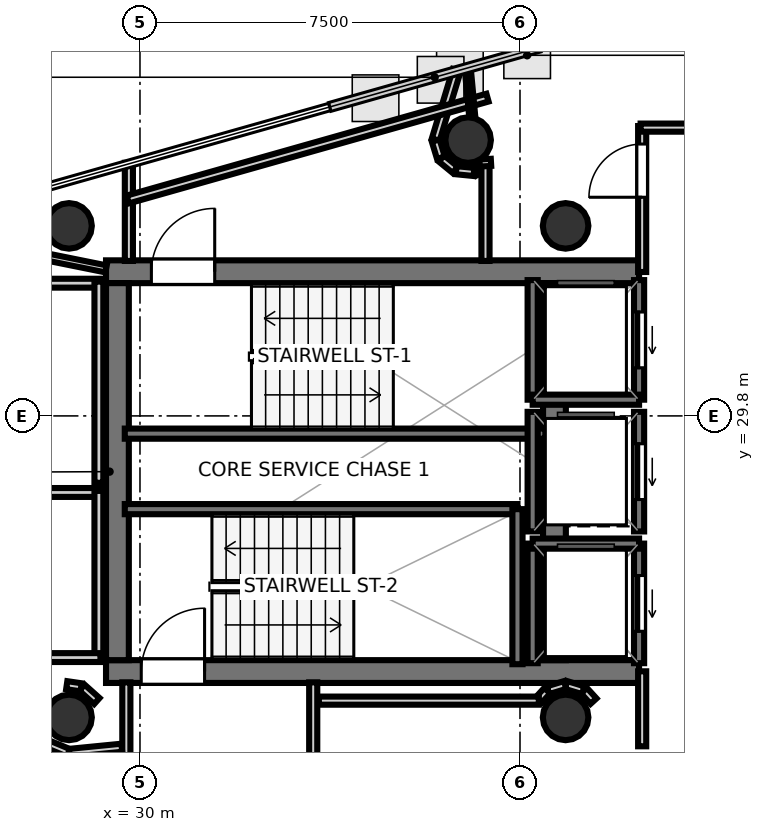
"""IFC4 building model, lengths in metres.
Left out: names, types, materials, properties, quantities, classifications, styles, units other than length and angle.
Written with IfcOpenShell. Run it as: python <this file> out.ifc"""

import sys

from ifc_helpers import new_model, si_unit, direction, frame, frame_2d, origin, origin_2d, place, context, subcontext, project, spatial, rectangle, hollow_circle, extrude, element, fill, save


model = new_model("IFC4")
c1 = context("Model", 3, precision=1e-05, world=origin(), true_north=direction((0.0, 1.0)))
c2 = subcontext(c1, "Body", "Model", "MODEL_VIEW")
j1 = project(units=[si_unit("LENGTHUNIT", "METRE"), si_unit("PLANEANGLEUNIT", "RADIAN")], contexts=[c1])
p1 = place(None, origin())
s1 = spatial("IfcSite", under=j1, at=p1, CompositionType="ELEMENT")
p2 = place(p1, origin())
s2 = spatial("IfcBuilding", under=s1, at=p2, CompositionType="ELEMENT")
p3 = place(p2, frame((0.0, 0.0, 317.6)))
s3 = spatial("IfcBuildingStorey", under=s2, at=p3, CompositionType="ELEMENT", Elevation=317.6)
p4 = place(p3, frame((29.33, 32.645, 0.0), z_axis=(0.0, 0.0, 1.0), x_axis=(1.0, 0.0, 0.0)))
e1 = element("IfcWall", 1, at=p4, inside=s3, PredefinedType="SHEAR", context=c2, shape_type="SweptSolid", body=[
    extrude(rectangle(XDim=10.52, YDim=0.45, at=frame_2d((5.26, 0.0))), origin(), (0.0, 0.0, 1.0), 3.4),
])
p5 = place(p4, frame((0.895, 0.0, 0.0)))
e2 = element("IfcOpeningElement", 2, at=p5, cuts=e1, PredefinedType="OPENING", context=c2, shape_type="SweptSolid", body=[
    extrude(rectangle(XDim=1.25, YDim=2.15, at=frame_2d((0.625, 1.075))), frame((0.0, 0.235, 0.0), z_axis=(0.0, -1.0, 0.0), x_axis=(1.0, 0.0, 0.0)), (0.0, 0.0, 1.0), 0.47),
])
p6 = place(p3, frame((29.33, 24.755, 0.0), z_axis=(0.0, 0.0, 1.0), x_axis=(1.0, 0.0, 0.0)))
e3 = element("IfcWall", 3, at=p6, inside=s3, PredefinedType="SHEAR", context=c2, shape_type="SweptSolid", body=[
    extrude(rectangle(XDim=10.52, YDim=0.45, at=frame_2d((5.26, 0.0))), origin(), (0.0, 0.0, 1.0), 3.4),
])
p7 = place(p6, frame((0.695, 0.0, 0.0)))
e4 = element("IfcOpeningElement", 4, at=p7, cuts=e3, PredefinedType="OPENING", context=c2, shape_type="SweptSolid", body=[
    extrude(rectangle(XDim=1.25, YDim=2.15, at=frame_2d((0.625, 1.075))), frame((0.0, 0.235, 0.0), z_axis=(0.0, -1.0, 0.0), x_axis=(1.0, 0.0, 0.0)), (0.0, 0.0, 1.0), 0.47),
])
for number, where, z_axis, x_axis in (
    (5, (29.555, 24.98, 0.0), (0.0, 0.0, 1.0), (0.0, 1.0, 0.0)),
    (6, (38.18, 24.98, 0.0), (0.0, 0.0, 1.0), (0.0, 1.0, 0.0)),
):
    element("IfcWall", number, at=place(p3, frame(where, z_axis=z_axis, x_axis=x_axis)), inside=s3, PredefinedType="SHEAR", context=c2, shape_type="SweptSolid", body=[
        extrude(rectangle(XDim=7.44, YDim=0.45, at=frame_2d((3.72, 0.0))), origin(), (0.0, 0.0, 1.0), 3.4),
    ])
for number, where, z_axis, x_axis in (
    (7, (28.6, 33.55, 0.0), (0.0, 0.0, 1.0), (1.0, 0.0, 0.0)),
    (8, (28.6, 23.85, 0.0), (0.0, 0.0, 1.0), (1.0, 0.0, 0.0)),
    (9, (38.4, 33.55, 0.0), (0.0, 0.0, 1.0), (1.0, 0.0, 0.0)),
    (10, (38.4, 23.85, 0.0), (0.0, 0.0, 1.0), (1.0, 0.0, 0.0)),
    (11, (36.476, 35.243, 0.0), (0.0, 0.0, 1.0), (1.0, 0.0, 0.0)),
):
    element("IfcColumn", number, at=place(p3, frame(where, z_axis=z_axis, x_axis=x_axis)), inside=s3, PredefinedType="COLUMN", context=c2, shape_type="SweptSolid", body=[
        extrude(hollow_circle(Radius=0.45, WallThickness=0.025, at=origin_2d()), origin(), (0.0, 0.0, 1.0), 3.7),
    ])
p8 = place(p3, frame((29.7, 29.45, 0.0), z_axis=(0.0, 0.0, 1.0), x_axis=(1.0, 0.0, 0.0)))
e12 = element("IfcWall", 12, at=p8, inside=s3, PredefinedType="SOLIDWALL", context=c2, shape_type="SweptSolid", body=[
    extrude(rectangle(XDim=8.3, YDim=0.2, at=frame_2d((4.15, 0.0))), origin(), (0.0, 0.0, 1.0), 3.4),
])
p9 = place(p3, frame((29.7, 27.96, 0.0), z_axis=(0.0, 0.0, 1.0), x_axis=(1.0, 0.0, 0.0)))
e13 = element("IfcWall", 13, at=p9, inside=s3, PredefinedType="SOLIDWALL", context=c2, shape_type="SweptSolid", body=[
    extrude(rectangle(XDim=7.75, YDim=0.2, at=frame_2d((3.875, 0.0))), origin(), (0.0, 0.0, 1.0), 3.4),
])
p10 = place(p3, frame((37.45, 24.9, 0.0), z_axis=(0.0, 0.0, 1.0), x_axis=(0.0, 1.0, 0.0)))
e14 = element("IfcWall", 14, at=p10, inside=s3, PredefinedType="SOLIDWALL", context=c2, shape_type="SweptSolid", body=[
    extrude(rectangle(XDim=3.06, YDim=0.2, at=frame_2d((1.53, 0.0))), origin(), (0.0, 0.0, 1.0), 3.4),
])
p11 = place(p3, frame((39.85, 30.12, 0.0), z_axis=(0.0, 0.0, 1.0), x_axis=(0.0, 1.0, 0.0)))
e15 = element("IfcWall", 15, at=p11, inside=s3, PredefinedType="SOLIDWALL", context=c2, shape_type="SweptSolid", body=[
    extrude(rectangle(XDim=2.36, YDim=0.2, at=frame_2d((1.18, 0.0))), origin(), (0.0, 0.0, 1.0), 3.4),
])
p12 = place(p11, frame((0.63, 0.0, 0.0)))
e16 = element("IfcOpeningElement", 16, at=p12, cuts=e15, PredefinedType="OPENING", context=c2, shape_type="SweptSolid", body=[
    extrude(rectangle(XDim=1.1, YDim=2.15, at=frame_2d((0.55, 1.075))), frame((0.0, 0.11, 0.0), z_axis=(0.0, -1.0, 0.0), x_axis=(1.0, 0.0, 0.0)), (0.0, 0.0, 1.0), 0.22),
])
p13 = place(p3, frame((37.75, 30.12, 0.0), z_axis=(0.0, 0.0, 1.0), x_axis=(0.0, 1.0, 0.0)))
e17 = element("IfcWall", 17, at=p13, inside=s3, PredefinedType="SOLIDWALL", context=c2, shape_type="SweptSolid", body=[
    extrude(rectangle(XDim=2.36, YDim=0.2, at=frame_2d((1.18, 0.0))), origin(), (0.0, 0.0, 1.0), 3.4),
])
p14 = place(p3, frame((37.75, 30.12, 0.0), z_axis=(0.0, 0.0, 1.0), x_axis=(1.0, 0.0, 0.0)))
e18 = element("IfcWall", 18, at=p14, inside=s3, PredefinedType="SOLIDWALL", context=c2, shape_type="SweptSolid", body=[
    extrude(rectangle(XDim=2.1, YDim=0.2, at=frame_2d((1.05, 0.0))), origin(), (0.0, 0.0, 1.0), 3.4),
])
p15 = place(p3, frame((39.85, 24.92, 0.0), z_axis=(0.0, 0.0, 1.0), x_axis=(0.0, 1.0, 0.0)))
e19 = element("IfcWall", 19, at=p15, inside=s3, PredefinedType="SOLIDWALL", context=c2, shape_type="SweptSolid", body=[
    extrude(rectangle(XDim=2.36, YDim=0.2, at=frame_2d((1.18, 0.0))), origin(), (0.0, 0.0, 1.0), 3.4),
])
p16 = place(p15, frame((0.63, 0.0, 0.0)))
e20 = element("IfcOpeningElement", 20, at=p16, cuts=e19, PredefinedType="OPENING", context=c2, shape_type="SweptSolid", body=[
    extrude(rectangle(XDim=1.1, YDim=2.15, at=frame_2d((0.55, 1.075))), frame((0.0, 0.11, 0.0), z_axis=(0.0, -1.0, 0.0), x_axis=(1.0, 0.0, 0.0)), (0.0, 0.0, 1.0), 0.22),
])
p17 = place(p3, frame((37.75, 24.92, 0.0), z_axis=(0.0, 0.0, 1.0), x_axis=(0.0, 1.0, 0.0)))
e21 = element("IfcWall", 21, at=p17, inside=s3, PredefinedType="SOLIDWALL", context=c2, shape_type="SweptSolid", body=[
    extrude(rectangle(XDim=2.36, YDim=0.2, at=frame_2d((1.18, 0.0))), origin(), (0.0, 0.0, 1.0), 3.4),
])
p18 = place(p3, frame((37.75, 27.28, 0.0), z_axis=(0.0, 0.0, 1.0), x_axis=(1.0, 0.0, 0.0)))
e22 = element("IfcWall", 22, at=p18, inside=s3, PredefinedType="SOLIDWALL", context=c2, shape_type="SweptSolid", body=[
    extrude(rectangle(XDim=2.1, YDim=0.2, at=frame_2d((1.05, 0.0))), origin(), (0.0, 0.0, 1.0), 3.4),
])
p19 = place(p3, frame((39.85, 27.52, 0.0), z_axis=(0.0, 0.0, 1.0), x_axis=(0.0, 1.0, 0.0)))
e23 = element("IfcWall", 23, at=p19, inside=s3, PredefinedType="SOLIDWALL", context=c2, shape_type="SweptSolid", body=[
    extrude(rectangle(XDim=2.36, YDim=0.2, at=frame_2d((1.18, 0.0))), origin(), (0.0, 0.0, 1.0), 3.4),
])
p20 = place(p19, frame((0.63, 0.0, 0.0)))
e24 = element("IfcOpeningElement", 24, at=p20, cuts=e23, PredefinedType="OPENING", context=c2, shape_type="SweptSolid", body=[
    extrude(rectangle(XDim=1.1, YDim=2.15, at=frame_2d((0.55, 1.075))), frame((0.0, 0.11, 0.0), z_axis=(0.0, -1.0, 0.0), x_axis=(1.0, 0.0, 0.0)), (0.0, 0.0, 1.0), 0.22),
])
p21 = place(p3, frame((37.75, 27.52, 0.0), z_axis=(0.0, 0.0, 1.0), x_axis=(0.0, 1.0, 0.0)))
e25 = element("IfcWall", 25, at=p21, inside=s3, PredefinedType="SOLIDWALL", context=c2, shape_type="SweptSolid", body=[
    extrude(rectangle(XDim=2.36, YDim=0.2, at=frame_2d((1.18, 0.0))), origin(), (0.0, 0.0, 1.0), 3.4),
])
p22 = place(p3, frame((36.252, 36.624, 0.0), z_axis=(0.0, 0.0, 1.0), x_axis=(-0.290314558178, -0.956931270944, 0.0)))
e26 = element("IfcWall", 26, at=p22, inside=s3, PredefinedType="PARTITIONING", context=c2, shape_type="SweptSolid", body=[
    extrude(rectangle(XDim=1.434, YDim=0.16, at=frame_2d((0.717, 0.0))), origin(), (0.0, 0.0, 1.0), 2.72),
])
p23 = place(p3, frame((35.836, 35.234, 0.0), z_axis=(0.0, 0.0, 1.0), x_axis=(0.29088731233, -0.956757321124, 0.0)))
e27 = element("IfcWall", 27, at=p23, inside=s3, PredefinedType="PARTITIONING", context=c2, shape_type="SweptSolid", body=[
    extrude(rectangle(XDim=0.354, YDim=0.16, at=frame_2d((0.177, 0.0))), origin(), (0.0, 0.0, 1.0), 2.72),
])
p24 = place(p3, frame((35.949, 34.88, 0.0), z_axis=(0.0, 0.0, 1.0), x_axis=(0.77300400279, -0.634401144128, 0.0)))
e28 = element("IfcWall", 28, at=p24, inside=s3, PredefinedType="PARTITIONING", context=c2, shape_type="SweptSolid", body=[
    extrude(rectangle(XDim=0.354, YDim=0.16, at=frame_2d((0.177, 0.0))), origin(), (0.0, 0.0, 1.0), 2.72),
])
p25 = place(p3, frame((36.24, 34.649, 0.0), z_axis=(0.0, 0.0, 1.0), x_axis=(0.995199611942, -0.097865889817, 0.0)))
e29 = element("IfcWall", 29, at=p25, inside=s3, PredefinedType="PARTITIONING", context=c2, shape_type="SweptSolid", body=[
    extrude(rectangle(XDim=0.354, YDim=0.16, at=frame_2d((0.177, 0.0))), origin(), (0.0, 0.0, 1.0), 2.72),
])
p26 = place(p3, frame((36.608, 34.617, 0.0), z_axis=(0.0, 0.0, 1.0), x_axis=(0.905429465341, 0.424496741203, 0.0)))
e30 = element("IfcWall", 30, at=p26, inside=s3, PredefinedType="PARTITIONING", context=c2, shape_type="SweptSolid", body=[
    extrude(rectangle(XDim=0.1, YDim=0.16, at=frame_2d((0.05, 0.0))), origin(), (0.0, 0.0, 1.0), 2.72),
])
p27 = place(p3, frame((36.819, 34.765, 0.0), z_axis=(0.0, 0.0, 1.0), x_axis=(0.0, -1.0, 0.0)))
e31 = element("IfcWall", 31, at=p27, inside=s3, PredefinedType="PARTITIONING", context=c2, shape_type="SweptSolid", body=[
    extrude(rectangle(XDim=1.907, YDim=0.16, at=frame_2d((0.953, 0.0))), origin(), (0.0, 0.0, 1.0), 2.72),
])
p28 = place(p3, frame((29.781, 32.858, 0.0), z_axis=(0.0, 0.0, 1.0), x_axis=(0.0, 1.0, 0.0)))
e32 = element("IfcWall", 32, at=p28, inside=s3, PredefinedType="PARTITIONING", context=c2, shape_type="SweptSolid", body=[
    extrude(rectangle(XDim=1.937, YDim=0.16, at=frame_2d((0.968, 0.0))), origin(), (0.0, 0.0, 1.0), 2.72),
])
p29 = place(p3, frame((29.758, 34.071, 0.0), z_axis=(0.0, 0.0, 1.0), x_axis=(0.962177906446, 0.272421872006, 0.0)))
e33 = element("IfcWall", 33, at=p29, inside=s3, PredefinedType="PARTITIONING", context=c2, shape_type="SweptSolid", body=[
    extrude(rectangle(XDim=7.379, YDim=0.16, at=frame_2d((3.689, 0.0))), origin(), (0.0, 0.0, 1.0), 2.72),
])
for number, where, z_axis, x_axis in (
    (34, (29.731, 21.85, 0.0), (0.0, 0.0, 1.0), (0.0, 1.0, 0.0)),
    (35, (33.419, 24.542, 0.0), (0.0, 0.0, 1.0), (0.0, -1.0, 0.0)),
):
    element("IfcWall", number, at=place(p3, frame(where, z_axis=z_axis, x_axis=x_axis)), inside=s3, PredefinedType="PARTITIONING", context=c2, shape_type="SweptSolid", body=[
        extrude(rectangle(XDim=2.692, YDim=0.16, at=frame_2d((1.346, 0.0))), origin(), (0.0, 0.0, 1.0), 2.72),
    ])
p30 = place(p3, frame((39.911, 23.28, 0.0), z_axis=(0.0, 0.0, 1.0), x_axis=(0.0, 1.0, 0.0)))
e36 = element("IfcWall", 36, at=p30, inside=s3, PredefinedType="PARTITIONING", context=c2, shape_type="SweptSolid", body=[
    extrude(rectangle(XDim=1.48, YDim=0.16, at=frame_2d((0.74, 0.0))), origin(), (0.0, 0.0, 1.0), 2.72),
])
p31 = place(p3, frame((39.911, 32.64, 0.0), z_axis=(0.0, 0.0, 1.0), x_axis=(0.0, 1.0, 0.0)))
e37 = element("IfcWall", 37, at=p31, inside=s3, PredefinedType="PARTITIONING", context=c2, shape_type="SweptSolid", body=[
    extrude(rectangle(XDim=2.88, YDim=0.16, at=frame_2d((1.44, 0.0))), origin(), (0.0, 0.0, 1.0), 2.72),
])
p32 = place(p31, frame((1.475, 0.0, 0.0)))
e38 = element("IfcOpeningElement", 38, at=p32, cuts=e37, PredefinedType="OPENING", context=c2, shape_type="SweptSolid", body=[
    extrude(rectangle(XDim=1.05, YDim=2.15, at=frame_2d((0.525, 1.075))), frame((0.0, 0.09, 0.0), z_axis=(0.0, -1.0, 0.0), x_axis=(1.0, 0.0, 0.0)), (0.0, 0.0, 1.0), 0.18),
])
p33 = place(p3, frame((39.88, 35.489, 0.0), z_axis=(0.0, 0.0, 1.0), x_axis=(1.0, 0.0, 0.0)))
e39 = element("IfcWall", 39, at=p33, inside=s3, PredefinedType="PARTITIONING", context=c2, shape_type="SweptSolid", body=[
    extrude(rectangle(XDim=1.48, YDim=0.16, at=frame_2d((0.74, 0.0))), origin(), (0.0, 0.0, 1.0), 2.72),
])
p34 = place(p3, frame((27.72, 28.289, 0.0), z_axis=(0.0, 0.0, 1.0), x_axis=(1.0, 0.0, 0.0)))
e40 = element("IfcWall", 40, at=p34, inside=s3, PredefinedType="PLUMBINGWALL", context=c2, shape_type="SweptSolid", body=[
    extrude(rectangle(XDim=1.5, YDim=0.175, at=frame_2d((0.75, 0.0))), origin(), (0.0, 0.0, 1.0), 2.72),
])
p35 = place(p3, frame((29.189, 28.32, 0.0), z_axis=(0.0, 0.0, 1.0), x_axis=(0.0, -1.0, 0.0)))
e41 = element("IfcWall", 41, at=p35, inside=s3, PredefinedType="PLUMBINGWALL", context=c2, shape_type="SweptSolid", body=[
    extrude(rectangle(XDim=3.32, YDim=0.175, at=frame_2d((1.66, 0.0))), origin(), (0.0, 0.0, 1.0), 2.72),
])
for number, where, z_axis, x_axis in (
    (42, (29.22, 25.031, 0.0), (0.0, 0.0, 1.0), (-1.0, 0.0, 0.0)),
    (43, (27.72, 32.419, 0.0), (0.0, 0.0, 1.0), (1.0, 0.0, 0.0)),
):
    element("IfcWall", number, at=place(p3, frame(where, z_axis=z_axis, x_axis=x_axis)), inside=s3, PredefinedType="PLUMBINGWALL", context=c2, shape_type="SweptSolid", body=[
        extrude(rectangle(XDim=1.5, YDim=0.175, at=frame_2d((0.75, 0.0))), origin(), (0.0, 0.0, 1.0), 2.72),
    ])
p36 = place(p3, frame((29.189, 32.45, 0.0), z_axis=(0.0, 0.0, 1.0), x_axis=(0.0, -1.0, 0.0)))
e44 = element("IfcWall", 44, at=p36, inside=s3, PredefinedType="PLUMBINGWALL", context=c2, shape_type="SweptSolid", body=[
    extrude(rectangle(XDim=3.97, YDim=0.175, at=frame_2d((1.985, 0.0))), origin(), (0.0, 0.0, 1.0), 2.72),
])
p37 = place(p3, frame((29.149, 24.173, 0.0), z_axis=(0.0, 0.0, 1.0), x_axis=(-0.745225165416, 0.666812906917, 0.0)))
e45 = element("IfcWall", 45, at=p37, inside=s3, PredefinedType="PARTITIONING", context=c2, shape_type="SweptSolid", body=[
    extrude(rectangle(XDim=0.396, YDim=0.16, at=frame_2d((0.198, 0.0))), origin(), (0.0, 0.0, 1.0), 2.72),
])
p38 = place(p3, frame((28.838, 24.444, 0.0), z_axis=(0.0, 0.0, 1.0), x_axis=(-0.989449148305, 0.144880581578, 0.0)))
e46 = element("IfcWall", 46, at=p38, inside=s3, PredefinedType="PARTITIONING", context=c2, shape_type="SweptSolid", body=[
    extrude(rectangle(XDim=0.286, YDim=0.16, at=frame_2d((0.143, 0.0))), origin(), (0.0, 0.0, 1.0), 2.72),
])
p39 = place(p3, frame((38.951, 24.171, 0.0), z_axis=(0.0, 0.0, 1.0), x_axis=(-0.674186852077, 0.738560822469, 0.0)))
e47 = element("IfcWall", 47, at=p39, inside=s3, PredefinedType="PARTITIONING", context=c2, shape_type="SweptSolid", body=[
    extrude(rectangle(XDim=0.281, YDim=0.16, at=frame_2d((0.14, 0.0))), origin(), (0.0, 0.0, 1.0), 2.72),
])
p40 = place(p3, frame((38.748, 24.387, 0.0), z_axis=(0.0, 0.0, 1.0), x_axis=(-0.956948991291, 0.290256142171, 0.0)))
e48 = element("IfcWall", 48, at=p40, inside=s3, PredefinedType="PARTITIONING", context=c2, shape_type="SweptSolid", body=[
    extrude(rectangle(XDim=0.354, YDim=0.16, at=frame_2d((0.177, 0.0))), origin(), (0.0, 0.0, 1.0), 2.72),
])
p41 = place(p3, frame((38.391, 24.49, 0.0), z_axis=(0.0, 0.0, 1.0), x_axis=(-0.957007018611, -0.290064762301, 0.0)))
e49 = element("IfcWall", 49, at=p41, inside=s3, PredefinedType="PARTITIONING", context=c2, shape_type="SweptSolid", body=[
    extrude(rectangle(XDim=0.354, YDim=0.16, at=frame_2d((0.177, 0.0))), origin(), (0.0, 0.0, 1.0), 2.72),
])
p42 = place(p3, frame((38.038, 24.378, 0.0), z_axis=(0.0, 0.0, 1.0), x_axis=(-0.673658387955, -0.739042878551, 0.0)))
e50 = element("IfcWall", 50, at=p42, inside=s3, PredefinedType="PARTITIONING", context=c2, shape_type="SweptSolid", body=[
    extrude(rectangle(XDim=0.246, YDim=0.16, at=frame_2d((0.123, 0.0))), origin(), (0.0, 0.0, 1.0), 2.72),
])
p43 = place(p3, frame((37.872, 24.181, 0.0), z_axis=(0.0, 0.0, 1.0), x_axis=(-1.0, 0.0, 0.0)))
e51 = element("IfcWall", 51, at=p43, inside=s3, PredefinedType="PARTITIONING", context=c2, shape_type="SweptSolid", body=[
    extrude(rectangle(XDim=4.342, YDim=0.16, at=frame_2d((2.171, 0.0))), origin(), (0.0, 0.0, 1.0), 2.72),
])
p44 = place(p3, frame((28.115, 23.348, 0.0), z_axis=(0.0, 0.0, 1.0), x_axis=(0.923807847969, -0.382856448334, 0.0)))
e52 = element("IfcWall", 52, at=p44, inside=s3, PredefinedType="PARTITIONING", context=c2, shape_type="SweptSolid", body=[
    extrude(rectangle(XDim=0.513, YDim=0.16, at=frame_2d((0.256, 0.0))), origin(), (0.0, 0.0, 1.0), 2.72),
])
p45 = place(p3, frame((28.603, 23.149, 0.0), z_axis=(0.0, 0.0, 1.0), x_axis=(0.995179827095, 0.098066873836, 0.0)))
e53 = element("IfcWall", 53, at=p45, inside=s3, PredefinedType="PARTITIONING", context=c2, shape_type="SweptSolid", body=[
    extrude(rectangle(XDim=1.043, YDim=0.16, at=frame_2d((0.521, 0.0))), origin(), (0.0, 0.0, 1.0), 2.72),
])
p46 = place(p3, frame((29.33, 32.701, 0.0), z_axis=(0.0, 0.0, 1.0), x_axis=(-0.980269851438, 0.197663902525, 0.0)))
e54 = element("IfcWall", 54, at=p46, inside=s3, PredefinedType="PARTITIONING", context=c2, shape_type="SweptSolid", body=[
    extrude(rectangle(XDim=4.094, YDim=0.14, at=frame_2d((2.047, 0.0))), origin(), (0.0, 0.0, 1.0), 2.72),
])
p47 = place(p3, frame((36.928, 34.804, 0.0), z_axis=(0.0, 0.0, 1.0), x_axis=(-0.998281456217, -0.058601486101, 0.0)))
e55 = element("IfcWall", 55, at=p47, inside=s3, PredefinedType="PARTITIONING", context=c2, shape_type="SweptSolid", body=[
    extrude(rectangle(XDim=0.238, YDim=0.14, at=frame_2d((0.119, 0.0))), origin(), (0.0, 0.0, 1.0), 2.72),
])
p48 = place(p3, frame((36.645, 34.765, 0.0), z_axis=(0.0, 0.0, 1.0), x_axis=(-0.093054792145, 0.995660989323, 0.0)))
e56 = element("IfcWall", 56, at=p48, inside=s3, PredefinedType="PARTITIONING", context=c2, shape_type="SweptSolid", body=[
    extrude(rectangle(XDim=1.931, YDim=0.12, at=frame_2d((0.965, 0.0))), origin(), (0.0, 0.0, 1.0), 2.72),
])
p49 = place(p5, origin())
e57 = element("IfcDoor", 57, at=p49, inside=s3, OperationType="SINGLE_SWING_RIGHT", PredefinedType="DOOR", context=c2, shape_type="SweptSolid", body=[
    extrude(rectangle(XDim=1.25, YDim=2.15, at=frame_2d((0.625, 1.075))), frame((0.0, 0.025, 0.0), z_axis=(0.0, -1.0, 0.0), x_axis=(1.0, 0.0, 0.0)), (0.0, 0.0, 1.0), 0.05),
])
fill(e2, e57)
p50 = place(p7, origin())
e58 = element("IfcDoor", 58, at=p50, inside=s3, OperationType="SINGLE_SWING_RIGHT", PredefinedType="DOOR", context=c2, shape_type="SweptSolid", body=[
    extrude(rectangle(XDim=1.25, YDim=2.15, at=frame_2d((0.625, 1.075))), frame((0.0, 0.025, 0.0), z_axis=(0.0, -1.0, 0.0), x_axis=(1.0, 0.0, 0.0)), (0.0, 0.0, 1.0), 0.05),
])
fill(e4, e58)
p51 = place(p12, origin())
e59 = element("IfcDoor", 59, at=p51, inside=s3, OperationType="SLIDING_TO_LEFT", PredefinedType="DOOR", context=c2, shape_type="SweptSolid", body=[
    extrude(rectangle(XDim=1.1, YDim=2.15, at=frame_2d((0.55, 1.075))), frame((0.0, 0.025, 0.0), z_axis=(0.0, -1.0, 0.0), x_axis=(1.0, 0.0, 0.0)), (0.0, 0.0, 1.0), 0.05),
])
fill(e16, e59)
p52 = place(p16, origin())
e60 = element("IfcDoor", 60, at=p52, inside=s3, OperationType="SLIDING_TO_LEFT", PredefinedType="DOOR", context=c2, shape_type="SweptSolid", body=[
    extrude(rectangle(XDim=1.1, YDim=2.15, at=frame_2d((0.55, 1.075))), frame((0.0, 0.025, 0.0), z_axis=(0.0, -1.0, 0.0), x_axis=(1.0, 0.0, 0.0)), (0.0, 0.0, 1.0), 0.05),
])
fill(e20, e60)
p53 = place(p20, origin())
e61 = element("IfcDoor", 61, at=p53, inside=s3, OperationType="SLIDING_TO_LEFT", PredefinedType="DOOR", context=c2, shape_type="SweptSolid", body=[
    extrude(rectangle(XDim=1.1, YDim=2.15, at=frame_2d((0.55, 1.075))), frame((0.0, 0.025, 0.0), z_axis=(0.0, -1.0, 0.0), x_axis=(1.0, 0.0, 0.0)), (0.0, 0.0, 1.0), 0.05),
])
fill(e24, e61)
p54 = place(p32, origin())
e62 = element("IfcDoor", 62, at=p54, inside=s3, OperationType="SINGLE_SWING_LEFT", PredefinedType="DOOR", context=c2, shape_type="SweptSolid", body=[
    extrude(rectangle(XDim=1.05, YDim=2.15, at=frame_2d((0.525, 1.075))), frame((0.0, 0.025, 0.0), z_axis=(0.0, -1.0, 0.0), x_axis=(1.0, 0.0, 0.0)), (0.0, 0.0, 1.0), 0.05),
])
fill(e38, e62)
save(model, sys.argv[1])
